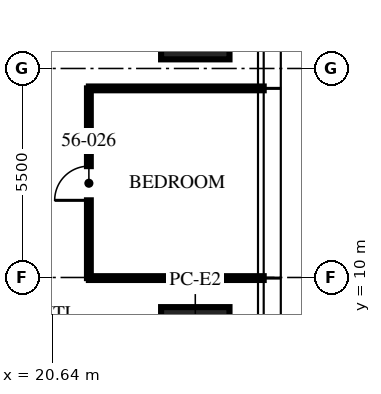
"""IFC4 building model, lengths in metres.
Left out: names, types, materials, properties, quantities, classifications, styles, units other than length and angle.
Written with IfcOpenShell. Run it as: python <this file> out.ifc"""

import sys

from ifc_helpers import new_model, si_unit, direction, frame, frame_2d, origin, origin_2d, place, context, subcontext, project, spatial, rectangle, extrude, element, fill, save


model = new_model("IFC4")
c1 = context("Model", 3, precision=1e-05, world=origin(), true_north=direction((0.0, 1.0)))
c2 = subcontext(c1, "Body", "Model", "MODEL_VIEW")
j1 = project(units=[si_unit("LENGTHUNIT", "METRE"), si_unit("PLANEANGLEUNIT", "RADIAN")], contexts=[c1])
p1 = place(None, origin())
s1 = spatial("IfcSite", under=j1, at=p1, CompositionType="ELEMENT")
p2 = place(p1, origin())
s2 = spatial("IfcBuilding", under=s1, at=p2, CompositionType="ELEMENT")
p3 = place(p2, frame((0.0, 0.0, 225.75)))
s3 = spatial("IfcBuildingStorey", under=s2, at=p3, CompositionType="ELEMENT", Elevation=225.75)
for number, where, z_axis, x_axis in (
    (1, (24.4, 16.64, 0.0), (0.0, 0.0, 1.0), (0.0, 1.0, 0.0)),
    (2, (24.4, 8.32, 0.0), (0.0, 0.0, 1.0), (0.0, 1.0, 0.0)),
):
    element("IfcColumn", number, at=place(p3, frame(where, z_axis=z_axis, x_axis=x_axis)), inside=s3, PredefinedType="COLUMN", context=c2, shape_type="SweptSolid", body=[
        extrude(rectangle(XDim=1.8, YDim=1.8, at=origin_2d()), origin(), (0.0, 0.0, 1.0), 3.75),
    ])
for number, where, z_axis, x_axis in (
    (3, (21.6, 9.984, 0.0), (0.0, 0.0, 1.0), (1.0, 0.0, 0.0)),
    (4, (21.6, 14.976, 0.0), (0.0, 0.0, 1.0), (1.0, 0.0, 0.0)),
):
    element("IfcWall", number, at=place(p3, frame(where, z_axis=z_axis, x_axis=x_axis)), inside=s3, PredefinedType="PARTITIONING", context=c2, shape_type="SweptSolid", body=[
        extrude(rectangle(XDim=4.6, YDim=0.1, at=frame_2d((2.3, 0.0))), origin(), (0.0, 0.0, 1.0), 2.91),
    ])
p4 = place(p3, frame((21.6, 9.984, 0.0), z_axis=(0.0, 0.0, 1.0), x_axis=(0.0, 1.0, 0.0)))
e5 = element("IfcWall", 5, at=p4, inside=s3, PredefinedType="PARTITIONING", context=c2, shape_type="SweptSolid", body=[
    extrude(rectangle(XDim=4.992, YDim=0.1, at=frame_2d((2.496, 0.0))), origin(), (0.0, 0.0, 1.0), 2.81),
])
p5 = place(p4, frame((2.046, 0.0, 0.0)))
e6 = element("IfcOpeningElement", 6, at=p5, cuts=e5, PredefinedType="OPENING", context=c2, shape_type="SweptSolid", body=[
    extrude(rectangle(XDim=0.9, YDim=2.1, at=frame_2d((0.45, 1.05))), frame((0.0, 0.06, 0.0), z_axis=(0.0, -1.0, 0.0), x_axis=(1.0, 0.0, 0.0)), (0.0, 0.0, 1.0), 0.12),
])
p6 = place(p5, origin())
e7 = element("IfcDoor", 7, at=p6, inside=s3, OperationType="SINGLE_SWING_LEFT", PredefinedType="DOOR", context=c2, shape_type="SweptSolid", body=[
    extrude(rectangle(XDim=0.9, YDim=2.1, at=frame_2d((0.45, 1.05))), frame((0.0, 0.025, 0.0), z_axis=(0.0, -1.0, 0.0), x_axis=(1.0, 0.0, 0.0)), (0.0, 0.0, 1.0), 0.05),
])
fill(e6, e7)
save(model, sys.argv[1])
